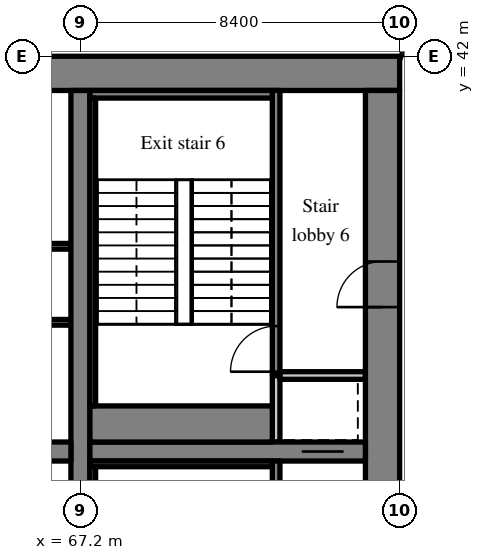
"""IFC4 building model, lengths in metres.
Left out: names, types, materials, properties, quantities, classifications, styles, units other than length and angle.
Written with IfcOpenShell. Run it as: python <this file> out.ifc"""

import sys

from ifc_helpers import new_model, si_unit, direction, frame, frame_2d, origin, place, context, subcontext, project, spatial, rectangle, extrude, source, transform, mapped, element, fill, save


model = new_model("IFC4")
c1 = context("Model", 3, precision=1e-05, world=origin(), true_north=direction((0.0, 1.0)))
c2 = subcontext(c1, "Body", "Model", "MODEL_VIEW")
j1 = project(units=[si_unit("LENGTHUNIT", "METRE"), si_unit("PLANEANGLEUNIT", "RADIAN")], contexts=[c1])
p1 = place(None, origin())
s1 = spatial("IfcSite", under=j1, at=p1, CompositionType="ELEMENT")
p2 = place(p1, origin())
s2 = spatial("IfcBuilding", under=s1, at=p2, CompositionType="ELEMENT")
p3 = place(p2, frame((0.0, 0.0, 137.0)))
s3 = spatial("IfcBuildingStorey", under=s2, at=p3, CompositionType="ELEMENT", Elevation=137.0)
m1 = source(origin(), c2, "Body", "SweptSolid", [
    extrude(rectangle(XDim=50.4, YDim=0.9, at=frame_2d((25.2, 0.0))), origin(), (0.0, 0.0, 1.0), 3.52),
])
p4 = place(p3, frame((25.2, 41.55, 0.0), z_axis=(0.0, 0.0, 1.0), x_axis=(1.0, 0.0, 0.0)))
e1 = element("IfcWall", 1, at=p4, inside=s3, PredefinedType="SHEAR", context=c2, shape_type="MappedRepresentation", body=[
    mapped(m1, transform((0.0, 0.0, 0.0), scale=1.0)),
])
m2 = source(origin(), c2, "Body", "SweptSolid", [
    extrude(rectangle(XDim=18.2, YDim=0.9, at=frame_2d((9.1, 0.0))), origin(), (0.0, 0.0, 1.0), 3.52),
])
p5 = place(p3, frame((75.15, 22.9, 0.0), z_axis=(0.0, 0.0, 1.0), x_axis=(0.0, 1.0, 0.0)))
e2 = element("IfcWall", 2, at=p5, inside=s3, PredefinedType="SHEAR", context=c2, shape_type="MappedRepresentation", body=[
    mapped(m2, transform((0.0, 0.0, 0.0), scale=1.0)),
])
m3 = source(origin(), c2, "Body", "SweptSolid", [
    extrude(rectangle(XDim=1.0, YDim=2.1, at=frame_2d((0.5, 1.05))), frame((0.0, 0.46, 0.0), z_axis=(0.0, -1.0, 0.0), x_axis=(1.0, 0.0, 0.0)), (0.0, 0.0, 1.0), 0.92),
])
p6 = place(p5, frame((2.6, 0.0, 0.0)))
e3 = element("IfcOpeningElement", 3, at=p6, cuts=e2, PredefinedType="OPENING", context=c2, shape_type="MappedRepresentation", body=[
    mapped(m3, transform((0.0, 0.0, 0.0), scale=1.0)),
])
m4 = source(origin(), c2, "Body", "SweptSolid", [
    extrude(rectangle(XDim=1.2, YDim=2.1, at=frame_2d((0.6, 1.05))), frame((0.0, 0.46, 0.0), z_axis=(0.0, -1.0, 0.0), x_axis=(1.0, 0.0, 0.0)), (0.0, 0.0, 1.0), 0.92),
])
p7 = place(p5, frame((12.5, 0.0, 0.0)))
e4 = element("IfcOpeningElement", 4, at=p7, cuts=e2, PredefinedType="OPENING", context=c2, shape_type="MappedRepresentation", body=[
    mapped(m4, transform((0.0, 0.0, 0.0), scale=1.0)),
])
m5 = source(origin(), c2, "Body", "SweptSolid", [
    extrude(rectangle(XDim=18.2, YDim=0.5, at=frame_2d((9.1, 0.0))), origin(), (0.0, 0.0, 1.0), 3.52),
])
p8 = place(p3, frame((67.2, 22.9, 0.0), z_axis=(0.0, 0.0, 1.0), x_axis=(0.0, 1.0, 0.0)))
e5 = element("IfcWall", 5, at=p8, inside=s3, PredefinedType="SHEAR", context=c2, shape_type="MappedRepresentation", body=[
    mapped(m5, transform((0.0, 0.0, 0.0), scale=1.0)),
])
m6 = source(origin(), c2, "Body", "SweptSolid", [
    extrude(rectangle(XDim=16.3, YDim=0.5, at=frame_2d((8.15, 0.0))), origin(), (0.0, 0.0, 1.0), 3.52),
])
p9 = place(p3, frame((50.65, 31.6, 0.0), z_axis=(0.0, 0.0, 1.0), x_axis=(1.0, 0.0, 0.0)))
e6 = element("IfcWall", 6, at=p9, inside=s3, PredefinedType="SHEAR", context=c2, shape_type="MappedRepresentation", body=[
    mapped(m6, transform((0.0, 0.0, 0.0), scale=1.0)),
])
m7 = source(origin(), c2, "Body", "SweptSolid", [
    extrude(rectangle(XDim=1.0, YDim=2.1, at=frame_2d((0.5, 1.05))), frame((0.0, 0.26, 0.0), z_axis=(0.0, -1.0, 0.0), x_axis=(1.0, 0.0, 0.0)), (0.0, 0.0, 1.0), 0.52),
])
p10 = place(p9, frame((0.575, 0.0, 0.0)))
e7 = element("IfcOpeningElement", 7, at=p10, cuts=e6, PredefinedType="OPENING", context=c2, shape_type="MappedRepresentation", body=[
    mapped(m7, transform((0.0, 0.0, 0.0), scale=1.0)),
])
m8 = source(origin(), c2, "Body", "SweptSolid", [
    extrude(rectangle(XDim=7.25, YDim=0.5, at=frame_2d((3.625, 0.0))), origin(), (0.0, 0.0, 1.0), 3.52),
])
p11 = place(p3, frame((67.45, 31.6, 0.0), z_axis=(0.0, 0.0, 1.0), x_axis=(1.0, 0.0, 0.0)))
e8 = element("IfcWall", 8, at=p11, inside=s3, PredefinedType="SHEAR", context=c2, shape_type="MappedRepresentation", body=[
    mapped(m8, transform((0.0, 0.0, 0.0), scale=1.0)),
])
m9 = source(origin(), c2, "Body", "SweptSolid", [
    extrude(rectangle(XDim=1.1, YDim=2.1, at=frame_2d((0.55, 1.05))), frame((0.0, 0.26, 0.0), z_axis=(0.0, -1.0, 0.0), x_axis=(1.0, 0.0, 0.0)), (0.0, 0.0, 1.0), 0.52),
])
p12 = place(p11, frame((5.575, 0.0, 0.0)))
e9 = element("IfcOpeningElement", 9, at=p12, cuts=e8, PredefinedType="OPENING", context=c2, shape_type="MappedRepresentation", body=[
    mapped(m9, transform((0.0, 0.0, 0.0), scale=1.0)),
])
m10 = source(origin(), c2, "Body", "SweptSolid", [
    extrude(rectangle(XDim=14.15, YDim=0.15, at=frame_2d((7.075, 0.0))), origin(), (0.0, 0.0, 1.0), 3.52),
])
p13 = place(p3, frame((66.95, 35.0, 0.0), z_axis=(0.0, 0.0, 1.0), x_axis=(-1.0, 0.0, 0.0)))
e10 = element("IfcWall", 10, at=p13, inside=s3, PredefinedType="PARTITIONING", context=c2, shape_type="MappedRepresentation", body=[
    mapped(m10, transform((0.0, 0.0, 0.0), scale=1.0)),
])
m11 = source(origin(), c2, "Body", "SweptSolid", [
    extrude(rectangle(XDim=0.9, YDim=2.1, at=frame_2d((0.45, 1.05))), frame((0.0, 0.085, 0.0), z_axis=(0.0, -1.0, 0.0), x_axis=(1.0, 0.0, 0.0)), (0.0, 0.0, 1.0), 0.17),
])
p14 = place(p13, frame((0.958, 0.0, 0.0)))
e11 = element("IfcOpeningElement", 11, at=p14, cuts=e10, PredefinedType="OPENING", context=c2, shape_type="MappedRepresentation", body=[
    mapped(m11, transform((0.0, 0.0, 0.0), scale=1.0)),
])
p15 = place(p13, frame((5.884, 0.0, 0.0)))
e12 = element("IfcOpeningElement", 12, at=p15, cuts=e10, PredefinedType="OPENING", context=c2, shape_type="MappedRepresentation", body=[
    mapped(m11, transform((0.0, 0.0, 0.0), scale=1.0)),
])
p16 = place(p13, frame((11.514, 0.0, 0.0)))
e13 = element("IfcOpeningElement", 13, at=p16, cuts=e10, PredefinedType="OPENING", context=c2, shape_type="MappedRepresentation", body=[
    mapped(m11, transform((0.0, 0.0, 0.0), scale=1.0)),
])
m12 = source(origin(), c2, "Body", "SweptSolid", [
    extrude(rectangle(XDim=16.3, YDim=0.15, at=frame_2d((8.15, 0.0))), origin(), (0.0, 0.0, 1.0), 3.52),
])
p17 = place(p3, frame((66.95, 37.0, 0.0), z_axis=(0.0, 0.0, 1.0), x_axis=(-1.0, 0.0, 0.0)))
e14 = element("IfcWall", 14, at=p17, inside=s3, PredefinedType="PARTITIONING", context=c2, shape_type="MappedRepresentation", body=[
    mapped(m12, transform((0.0, 0.0, 0.0), scale=1.0)),
])
p18 = place(p17, frame((0.773, 0.0, 0.0)))
e15 = element("IfcOpeningElement", 15, at=p18, cuts=e14, PredefinedType="OPENING", context=c2, shape_type="MappedRepresentation", body=[
    mapped(m11, transform((0.0, 0.0, 0.0), scale=1.0)),
])
p19 = place(p17, frame((3.625, 0.0, 0.0)))
e16 = element("IfcOpeningElement", 16, at=p19, cuts=e14, PredefinedType="OPENING", context=c2, shape_type="MappedRepresentation", body=[
    mapped(m11, transform((0.0, 0.0, 0.0), scale=1.0)),
])
p20 = place(p17, frame((9.33, 0.0, 0.0)))
e17 = element("IfcOpeningElement", 17, at=p20, cuts=e14, PredefinedType="OPENING", context=c2, shape_type="MappedRepresentation", body=[
    mapped(m11, transform((0.0, 0.0, 0.0), scale=1.0)),
])
p21 = place(p17, frame((14.627, 0.0, 0.0)))
e18 = element("IfcOpeningElement", 18, at=p21, cuts=e14, PredefinedType="OPENING", context=c2, shape_type="MappedRepresentation", body=[
    mapped(m11, transform((0.0, 0.0, 0.0), scale=1.0)),
])
m13 = source(origin(), c2, "Body", "SweptSolid", [
    extrude(rectangle(XDim=8.45, YDim=0.2, at=frame_2d((4.225, 0.0))), origin(), (0.0, 0.0, 1.0), 3.52),
])
p22 = place(p3, frame((72.35, 22.9, 0.0), z_axis=(0.0, 0.0, 1.0), x_axis=(0.0, 1.0, 0.0)))
e19 = element("IfcWall", 19, at=p22, inside=s3, PredefinedType="SOLIDWALL", context=c2, shape_type="MappedRepresentation", body=[
    mapped(m13, transform((0.0, 0.0, 0.0), scale=1.0)),
])
m14 = source(origin(), c2, "Body", "SweptSolid", [
    extrude(rectangle(XDim=1.2, YDim=2.1, at=frame_2d((0.6, 1.05))), frame((0.0, 0.11, 0.0), z_axis=(0.0, -1.0, 0.0), x_axis=(1.0, 0.0, 0.0)), (0.0, 0.0, 1.0), 0.22),
])
p23 = place(p22, frame((0.7, 0.0, 0.0)))
e20 = element("IfcOpeningElement", 20, at=p23, cuts=e19, PredefinedType="OPENING", context=c2, shape_type="MappedRepresentation", body=[
    mapped(m14, transform((0.0, 0.0, 0.0), scale=1.0)),
])
m15 = source(origin(), c2, "Body", "SweptSolid", [
    extrude(rectangle(XDim=1.75, YDim=0.2, at=frame_2d((0.875, 0.0))), origin(), (0.0, 0.0, 1.0), 3.52),
])
p24 = place(p3, frame((72.35, 31.85, 0.0), z_axis=(0.0, 0.0, 1.0), x_axis=(0.0, 1.0, 0.0)))
e21 = element("IfcWall", 21, at=p24, inside=s3, PredefinedType="SOLIDWALL", context=c2, shape_type="MappedRepresentation", body=[
    mapped(m15, transform((0.0, 0.0, 0.0), scale=1.0)),
])
m16 = source(origin(), c2, "Body", "SweptSolid", [
    extrude(rectangle(XDim=2.25, YDim=0.2, at=frame_2d((1.125, 0.0))), origin(), (0.0, 0.0, 1.0), 3.52),
])
p25 = place(p3, frame((72.45, 33.6, 0.0), z_axis=(0.0, 0.0, 1.0), x_axis=(1.0, 0.0, 0.0)))
e22 = element("IfcWall", 22, at=p25, inside=s3, PredefinedType="SOLIDWALL", context=c2, shape_type="MappedRepresentation", body=[
    mapped(m16, transform((0.0, 0.0, 0.0), scale=1.0)),
])
m17 = source(origin(), c2, "Body", "SweptSolid", [
    extrude(rectangle(XDim=7.5, YDim=0.2, at=frame_2d((3.75, 0.0))), origin(), (0.0, 0.0, 1.0), 3.52),
])
p26 = place(p3, frame((72.35, 33.6, 0.0), z_axis=(0.0, 0.0, 1.0), x_axis=(0.0, 1.0, 0.0)))
e23 = element("IfcWall", 23, at=p26, inside=s3, PredefinedType="SOLIDWALL", context=c2, shape_type="MappedRepresentation", body=[
    mapped(m17, transform((0.0, 0.0, 0.0), scale=1.0)),
])
p27 = place(p26, frame((0.1, 0.0, 0.0)))
e24 = element("IfcOpeningElement", 24, at=p27, cuts=e23, PredefinedType="OPENING", context=c2, shape_type="MappedRepresentation", body=[
    mapped(m14, transform((0.0, 0.0, 0.0), scale=1.0)),
])
m18 = source(origin(), c2, "Body", "SweptSolid", [
    extrude(rectangle(XDim=4.8, YDim=0.15, at=frame_2d((2.4, 0.0))), origin(), (0.0, 0.0, 1.0), 3.52),
])
p28 = place(p3, frame((67.45, 31.275, 0.0), z_axis=(0.0, 0.0, 1.0), x_axis=(1.0, 0.0, 0.0)))
e25 = element("IfcWall", 25, at=p28, inside=s3, PredefinedType="SOLIDWALL", context=c2, shape_type="MappedRepresentation", body=[
    mapped(m18, transform((0.0, 0.0, 0.0), scale=1.0)),
])
m19 = source(origin(), c2, "Body", "SweptSolid", [
    extrude(rectangle(XDim=8.1, YDim=0.15, at=frame_2d((4.05, 0.0))), origin(), (0.0, 0.0, 1.0), 3.52),
])
p29 = place(p3, frame((67.525, 23.1, 0.0), z_axis=(0.0, 0.0, 1.0), x_axis=(0.0, 1.0, 0.0)))
e26 = element("IfcWall", 26, at=p29, inside=s3, PredefinedType="SOLIDWALL", context=c2, shape_type="MappedRepresentation", body=[
    mapped(m19, transform((0.0, 0.0, 0.0), scale=1.0)),
])
m20 = source(origin(), c2, "Body", "SweptSolid", [
    extrude(rectangle(XDim=4.8, YDim=0.2, at=frame_2d((2.4, 0.0))), origin(), (0.0, 0.0, 1.0), 3.52),
])
p30 = place(p3, frame((67.45, 41.0, 0.0), z_axis=(0.0, 0.0, 1.0), x_axis=(1.0, 0.0, 0.0)))
e27 = element("IfcWall", 27, at=p30, inside=s3, PredefinedType="SOLIDWALL", context=c2, shape_type="MappedRepresentation", body=[
    mapped(m20, transform((0.0, 0.0, 0.0), scale=1.0)),
])
m21 = source(origin(), c2, "Body", "SweptSolid", [
    extrude(rectangle(XDim=4.8, YDim=0.95, at=frame_2d((2.4, 0.0))), origin(), (0.0, 0.0, 1.0), 3.52),
])
p31 = place(p3, frame((67.45, 32.325, 0.0), z_axis=(0.0, 0.0, 1.0), x_axis=(1.0, 0.0, 0.0)))
e28 = element("IfcWall", 28, at=p31, inside=s3, PredefinedType="SOLIDWALL", context=c2, shape_type="MappedRepresentation", body=[
    mapped(m21, transform((0.0, 0.0, 0.0), scale=1.0)),
])
p32 = place(p3, frame((67.525, 32.8, 0.0), z_axis=(0.0, 0.0, 1.0), x_axis=(0.0, 1.0, 0.0)))
e29 = element("IfcWall", 29, at=p32, inside=s3, PredefinedType="SOLIDWALL", context=c2, shape_type="MappedRepresentation", body=[
    mapped(m19, transform((0.0, 0.0, 0.0), scale=1.0)),
])
m22 = source(origin(), c2, "Body", "SweptSolid", [
    extrude(rectangle(XDim=1.1, YDim=2.1, at=frame_2d((0.55, 1.05))), frame((0.0, 0.025, 0.0), z_axis=(0.0, -1.0, 0.0), x_axis=(1.0, 0.0, 0.0)), (0.0, 0.0, 1.0), 0.05),
])
p33 = place(p12, origin())
e30 = element("IfcDoor", 30, at=p33, inside=s3, OperationType="SLIDING_TO_RIGHT", PredefinedType="DOOR", context=c2, shape_type="MappedRepresentation", body=[
    mapped(m22, transform((0.0, 0.0, 0.0), scale=1.0)),
])
fill(e9, e30)
m23 = source(origin(), c2, "Body", "SweptSolid", [
    extrude(rectangle(XDim=1.2, YDim=2.1, at=frame_2d((0.6, 1.05))), frame((0.0, 0.025, 0.0), z_axis=(0.0, -1.0, 0.0), x_axis=(1.0, 0.0, 0.0)), (0.0, 0.0, 1.0), 0.05),
])
p34 = place(p27, origin())
e31 = element("IfcDoor", 31, at=p34, inside=s3, OperationType="SINGLE_SWING_LEFT", PredefinedType="DOOR", context=c2, shape_type="MappedRepresentation", body=[
    mapped(m23, transform((0.0, 0.0, 0.0), scale=1.0)),
])
fill(e24, e31)
p35 = place(p7, origin())
e32 = element("IfcDoor", 32, at=p35, inside=s3, OperationType="SINGLE_SWING_LEFT", PredefinedType="DOOR", context=c2, shape_type="MappedRepresentation", body=[
    mapped(m23, transform((0.0, 0.0, 0.0), scale=1.0)),
])
fill(e4, e32)
save(model, sys.argv[1])
